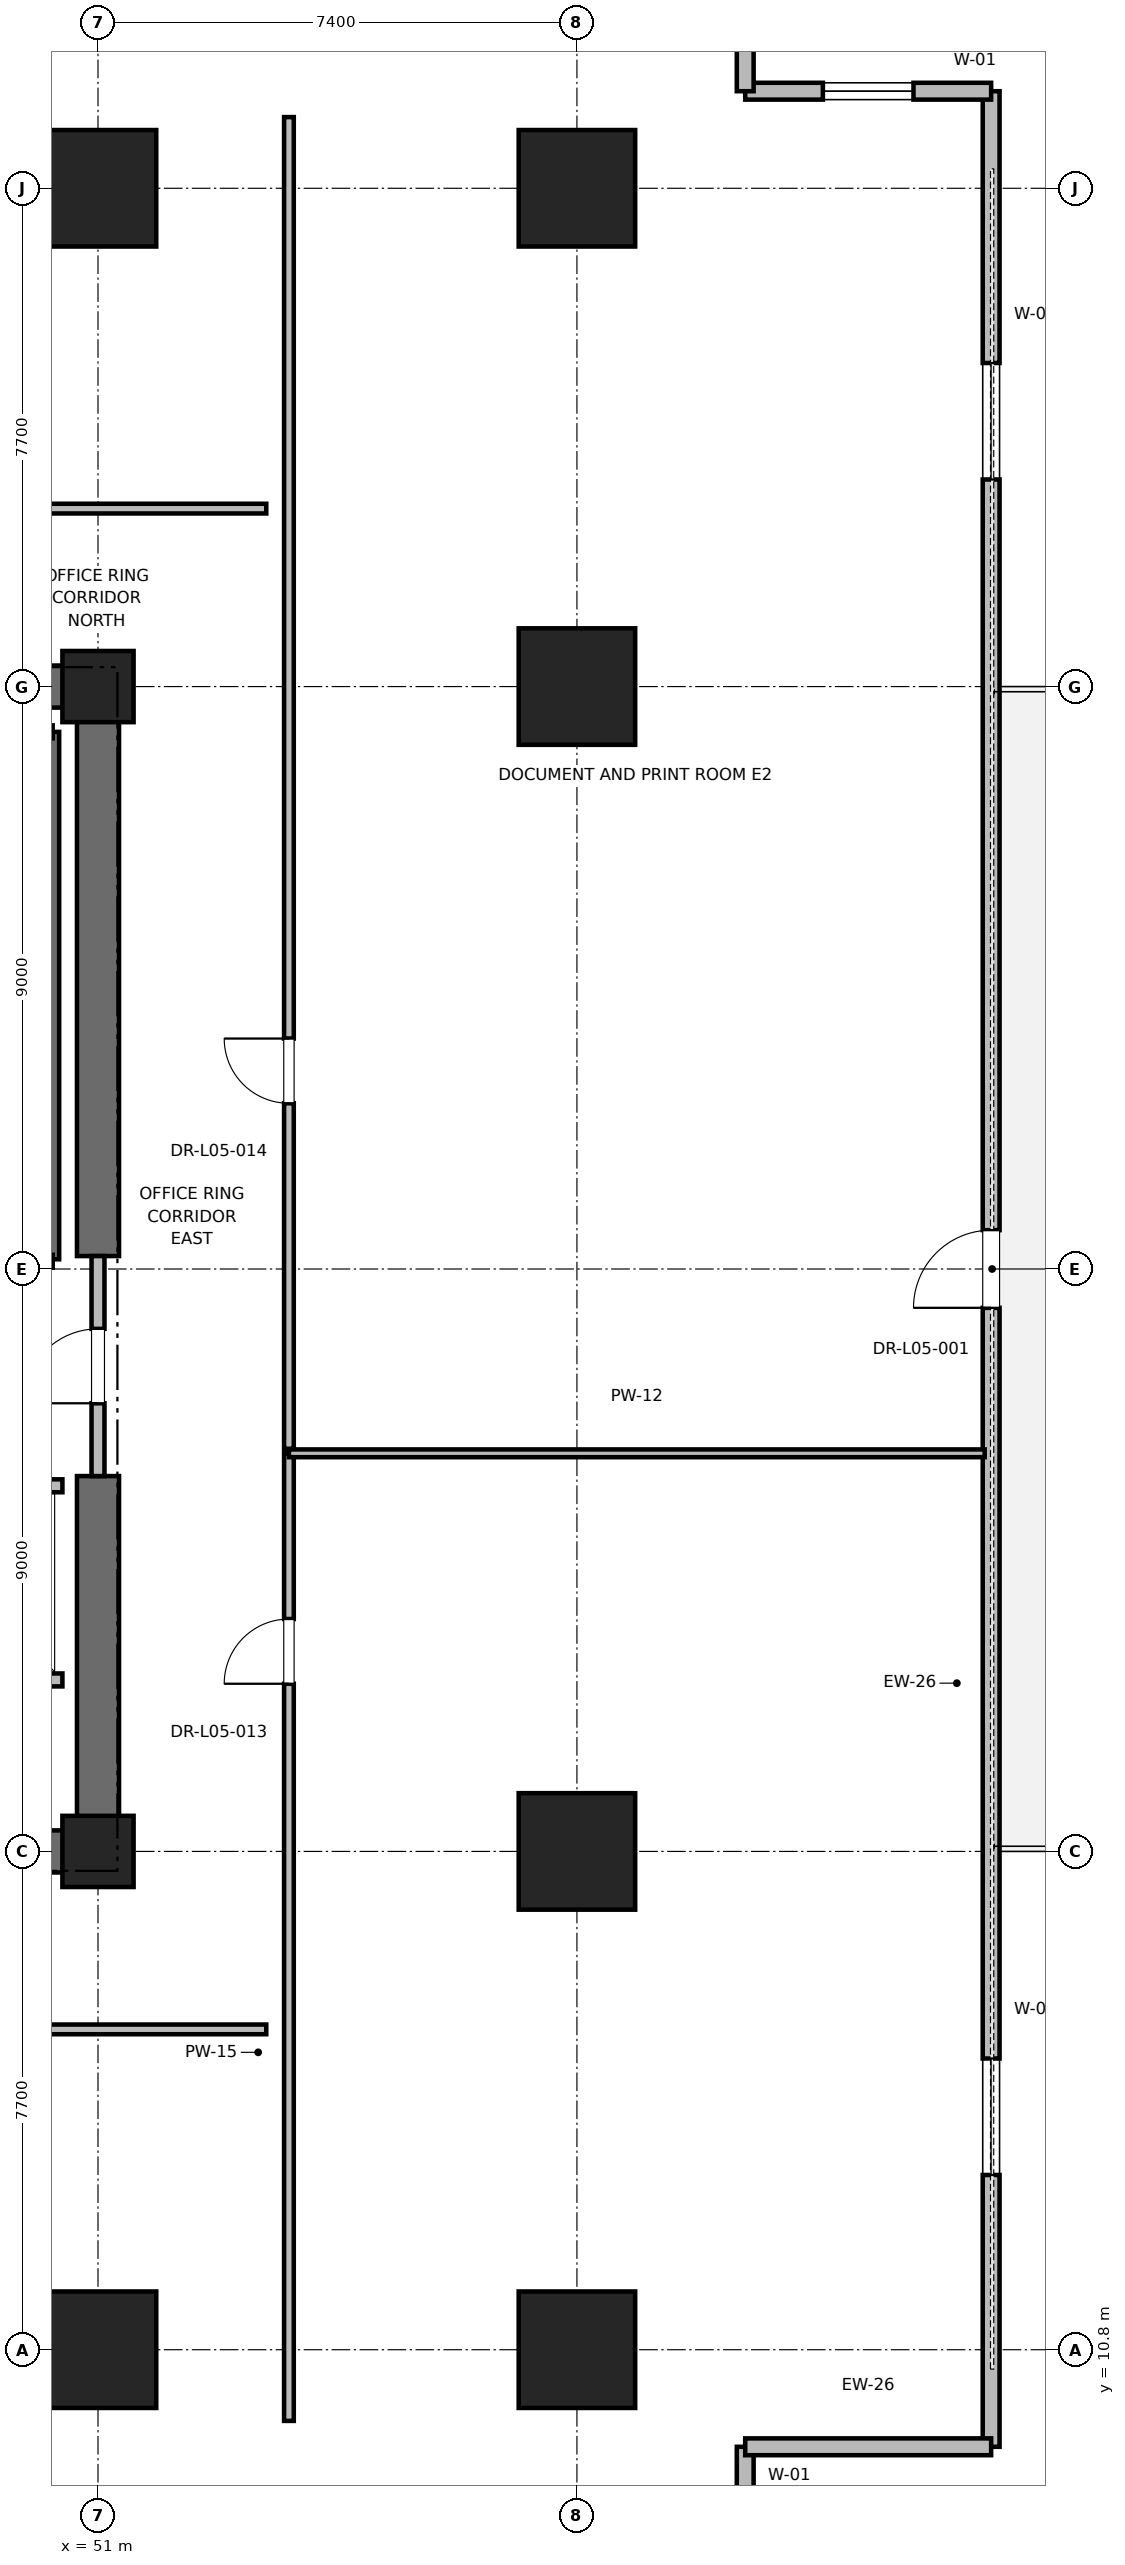
"""IFC4 building model, lengths in metres.
Left out: names, types, materials, properties, quantities, classifications, styles, units other than length and angle.
Written with IfcOpenShell. Run it as: python <this file> out.ifc"""

import sys

from ifc_helpers import new_model, si_unit, direction, frame, frame_2d, origin, origin_2d, place, context, subcontext, project, spatial, rectangle, extrude, element, fill, save


model = new_model("IFC4")
c1 = context("Model", 3, precision=1e-05, world=origin(), true_north=direction((0.0, 1.0)))
c2 = subcontext(c1, "Body", "Model", "MODEL_VIEW")
j1 = project(units=[si_unit("LENGTHUNIT", "METRE"), si_unit("PLANEANGLEUNIT", "RADIAN")], contexts=[c1])
p1 = place(None, origin())
s1 = spatial("IfcSite", under=j1, at=p1, CompositionType="ELEMENT")
p2 = place(p1, origin())
s2 = spatial("IfcBuilding", under=s1, at=p2, CompositionType="ELEMENT")
p3 = place(p2, frame((0.0, 0.0, 27.6)))
s3 = spatial("IfcBuildingStorey", under=s2, at=p3, CompositionType="ELEMENT", Elevation=27.6)
for number, where, z_axis, x_axis in (
    (1, (51.0, 10.8, 0.0), (0.0, 0.0, 1.0), (1.0, 0.0, 0.0)),
    (2, (51.0, 44.2, 0.0), (0.0, 0.0, 1.0), (1.0, 0.0, 0.0)),
    (3, (58.4, 18.5, 0.0), (0.0, 0.0, 1.0), (1.0, 0.0, 0.0)),
    (4, (58.4, 36.5, 0.0), (0.0, 0.0, 1.0), (1.0, 0.0, 0.0)),
    (5, (58.4, 10.8, 0.0), (0.0, 0.0, 1.0), (1.0, 0.0, 0.0)),
    (6, (58.4, 44.2, 0.0), (0.0, 0.0, 1.0), (1.0, 0.0, 0.0)),
):
    element("IfcColumn", number, at=place(p3, frame(where, z_axis=z_axis, x_axis=x_axis)), inside=s3, PredefinedType="COLUMN", context=c2, shape_type="SweptSolid", body=[
        extrude(rectangle(XDim=1.8, YDim=1.8, at=origin_2d()), origin(), (0.0, 0.0, 1.0), 4.0),
    ])
for number, where, z_axis, x_axis in (
    (7, (51.0, 18.5, 0.0), (0.0, 0.0, 1.0), (1.0, 0.0, 0.0)),
    (8, (51.0, 36.5, 0.0), (0.0, 0.0, 1.0), (1.0, 0.0, 0.0)),
):
    element("IfcColumn", number, at=place(p3, frame(where, z_axis=z_axis, x_axis=x_axis)), inside=s3, PredefinedType="PILASTER", context=c2, shape_type="SweptSolid", body=[
        extrude(rectangle(XDim=1.1, YDim=1.1, at=origin_2d()), origin(), (0.0, 0.0, 1.0), 4.0),
    ])
p4 = place(p3, frame((41.8, 18.5, 0.0), z_axis=(0.0, 0.0, 1.0), x_axis=(1.0, 0.0, 0.0)))
e9 = element("IfcWall", 9, at=p4, inside=s3, PredefinedType="SHEAR", context=c2, shape_type="SweptSolid", body=[
    extrude(rectangle(XDim=9.2, YDim=0.65, at=frame_2d((4.6, 0.0))), origin(), (0.0, 0.0, 1.0), 3.76),
])
for number, where, z_axis, x_axis in (
    (10, (45.2, 36.5, 0.0), (0.0, 0.0, 1.0), (1.0, 0.0, 0.0)),
    (11, (51.0, 18.5, 0.0), (0.0, 0.0, 1.0), (0.0, 1.0, 0.0)),
):
    element("IfcWall", number, at=place(p3, frame(where, z_axis=z_axis, x_axis=x_axis)), inside=s3, PredefinedType="SHEAR", context=c2, shape_type="SweptSolid", body=[
        extrude(rectangle(XDim=5.8, YDim=0.65, at=frame_2d((2.9, 0.0))), origin(), (0.0, 0.0, 1.0), 3.76),
    ])
p5 = place(p3, frame((51.0, 27.7, 0.0), z_axis=(0.0, 0.0, 1.0), x_axis=(0.0, 1.0, 0.0)))
e12 = element("IfcWall", 12, at=p5, inside=s3, PredefinedType="SHEAR", context=c2, shape_type="SweptSolid", body=[
    extrude(rectangle(XDim=8.8, YDim=0.65, at=frame_2d((4.4, 0.0))), origin(), (0.0, 0.0, 1.0), 3.76),
])
p6 = place(p3, frame((64.8, 9.3, 0.0), z_axis=(0.0, 0.0, 1.0), x_axis=(0.0, 1.0, 0.0)))
e13 = element("IfcWall", 13, at=p6, inside=s3, PredefinedType="PARAPET", context=c2, shape_type="SweptSolid", body=[
    extrude(rectangle(XDim=36.4, YDim=0.26, at=frame_2d((18.2, 0.0))), origin(), (0.0, 0.0, 1.0), 2.889),
])
p7 = place(p6, frame((4.2, 0.0, 0.85)))
e14 = element("IfcOpeningElement", 14, at=p7, cuts=e13, PredefinedType="OPENING", context=c2, shape_type="SweptSolid", body=[
    extrude(rectangle(XDim=1.8, YDim=2.2, at=frame_2d((0.9, 1.1))), frame((0.0, 0.13, 0.0), z_axis=(0.0, -1.0, 0.0), x_axis=(1.0, 0.0, 0.0)), (0.0, 0.0, 1.0), 0.26),
])
p8 = place(p6, frame((17.6, 0.0, 0.0)))
e15 = element("IfcOpeningElement", 15, at=p8, cuts=e13, PredefinedType="OPENING", context=c2, shape_type="SweptSolid", body=[
    extrude(rectangle(XDim=1.2, YDim=2.2, at=frame_2d((0.6, 1.1))), frame((0.0, 0.13, 0.0), z_axis=(0.0, -1.0, 0.0), x_axis=(1.0, 0.0, 0.0)), (0.0, 0.0, 1.0), 0.26),
])
p9 = place(p6, frame((30.4, 0.0, 0.85)))
e16 = element("IfcOpeningElement", 16, at=p9, cuts=e13, PredefinedType="OPENING", context=c2, shape_type="SweptSolid", body=[
    extrude(rectangle(XDim=1.8, YDim=2.2, at=frame_2d((0.9, 1.1))), frame((0.0, 0.13, 0.0), z_axis=(0.0, -1.0, 0.0), x_axis=(1.0, 0.0, 0.0)), (0.0, 0.0, 1.0), 0.26),
])
p10 = place(p3, frame((61.0, 5.9, 0.0), z_axis=(0.0, 0.0, 1.0), x_axis=(0.0, 1.0, 0.0)))
e17 = element("IfcWall", 17, at=p10, inside=s3, PredefinedType="PARAPET", context=c2, shape_type="SweptSolid", body=[
    extrude(rectangle(XDim=3.4, YDim=0.26, at=frame_2d((1.7, 0.0))), origin(), (0.0, 0.0, 1.0), 3.76),
])
p11 = place(p10, frame((1.0, 0.0, 0.85)))
e18 = element("IfcOpeningElement", 18, at=p11, cuts=e17, PredefinedType="OPENING", context=c2, shape_type="SweptSolid", body=[
    extrude(rectangle(XDim=1.4, YDim=2.0, at=frame_2d((0.7, 1.0))), frame((0.0, 0.13, 0.0), z_axis=(0.0, -1.0, 0.0), x_axis=(1.0, 0.0, 0.0)), (0.0, 0.0, 1.0), 0.26),
])
p12 = place(p3, frame((61.0, 9.3, 0.0), z_axis=(0.0, 0.0, 1.0), x_axis=(1.0, 0.0, 0.0)))
e19 = element("IfcWall", 19, at=p12, inside=s3, PredefinedType="PARAPET", context=c2, shape_type="SweptSolid", body=[
    extrude(rectangle(XDim=3.8, YDim=0.26, at=frame_2d((1.9, 0.0))), origin(), (0.0, 0.0, 1.0), 3.76),
])
p13 = place(p3, frame((64.8, 45.7, 0.0), z_axis=(0.0, 0.0, 1.0), x_axis=(-1.0, 0.0, 0.0)))
e20 = element("IfcWall", 20, at=p13, inside=s3, PredefinedType="PARAPET", context=c2, shape_type="SweptSolid", body=[
    extrude(rectangle(XDim=3.8, YDim=0.26, at=frame_2d((1.9, 0.0))), origin(), (0.0, 0.0, 1.0), 3.76),
])
p14 = place(p13, frame((1.2, 0.0, 0.85)))
e21 = element("IfcOpeningElement", 21, at=p14, cuts=e20, PredefinedType="OPENING", context=c2, shape_type="SweptSolid", body=[
    extrude(rectangle(XDim=1.4, YDim=2.0, at=frame_2d((0.7, 1.0))), frame((0.0, 0.13, 0.0), z_axis=(0.0, -1.0, 0.0), x_axis=(1.0, 0.0, 0.0)), (0.0, 0.0, 1.0), 0.26),
])
p15 = place(p3, frame((61.0, 45.7, 0.0), z_axis=(0.0, 0.0, 1.0), x_axis=(0.0, 1.0, 0.0)))
e22 = element("IfcWall", 22, at=p15, inside=s3, PredefinedType="PARAPET", context=c2, shape_type="SweptSolid", body=[
    extrude(rectangle(XDim=3.4, YDim=0.26, at=frame_2d((1.7, 0.0))), origin(), (0.0, 0.0, 1.0), 3.76),
])
p16 = place(p3, frame((50.3, 27.65, 0.0), z_axis=(0.0, 0.0, 1.0), x_axis=(0.0, 1.0, 0.0)))
e23 = element("IfcWall", 23, at=p16, inside=s3, PredefinedType="SOLIDWALL", context=c2, shape_type="SweptSolid", body=[
    extrude(rectangle(XDim=8.15, YDim=0.2, at=frame_2d((4.075, 0.0))), origin(), (0.0, 0.0, 1.0), 3.76),
])
p17 = place(p3, frame((51.0, 24.3, 0.0), z_axis=(0.0, 0.0, 1.0), x_axis=(0.0, 1.0, 0.0)))
e24 = element("IfcWall", 24, at=p17, inside=s3, PredefinedType="PARTITIONING", context=c2, shape_type="SweptSolid", body=[
    extrude(rectangle(XDim=3.4, YDim=0.2, at=frame_2d((1.7, 0.0))), origin(), (0.0, 0.0, 1.0), 2.54),
])
p18 = place(p17, frame((1.125, 0.0, 0.0)))
e25 = element("IfcOpeningElement", 25, at=p18, cuts=e24, PredefinedType="OPENING", context=c2, shape_type="SweptSolid", body=[
    extrude(rectangle(XDim=1.15, YDim=2.2, at=frame_2d((0.575, 1.1))), frame((0.0, 0.1, 0.0), z_axis=(0.0, -1.0, 0.0), x_axis=(1.0, 0.0, 0.0)), (0.0, 0.0, 1.0), 0.2),
])
p19 = place(p3, frame((47.85, 21.15, 0.0), z_axis=(0.0, 0.0, 1.0), x_axis=(1.0, 0.0, 0.0)))
e26 = element("IfcWall", 26, at=p19, inside=s3, PredefinedType="SOLIDWALL", context=c2, shape_type="SweptSolid", body=[
    extrude(rectangle(XDim=2.6, YDim=0.2, at=frame_2d((1.3, 0.0))), origin(), (0.0, 0.0, 1.0), 3.76),
])
p20 = place(p3, frame((50.45, 24.15, 0.0), z_axis=(0.0, 0.0, 1.0), x_axis=(-1.0, 0.0, 0.0)))
e27 = element("IfcWall", 27, at=p20, inside=s3, PredefinedType="SOLIDWALL", context=c2, shape_type="SweptSolid", body=[
    extrude(rectangle(XDim=2.6, YDim=0.2, at=frame_2d((1.3, 0.0))), origin(), (0.0, 0.0, 1.0), 2.54),
])
p21 = place(p20, frame((0.75, 0.0, 0.0)))
e28 = element("IfcOpeningElement", 28, at=p21, cuts=e27, PredefinedType="OPENING", context=c2, shape_type="SweptSolid", body=[
    extrude(rectangle(XDim=1.1, YDim=2.2, at=frame_2d((0.55, 1.1))), frame((0.0, 0.1, 0.0), z_axis=(0.0, -1.0, 0.0), x_axis=(1.0, 0.0, 0.0)), (0.0, 0.0, 1.0), 0.2),
])
p22 = place(p3, frame((38.982, 39.25, 0.0), z_axis=(0.0, 0.0, 1.0), x_axis=(1.0, 0.0, 0.0)))
e29 = element("IfcWall", 29, at=p22, inside=s3, PredefinedType="PARTITIONING", context=c2, shape_type="SweptSolid", body=[
    extrude(rectangle(XDim=14.618, YDim=0.15, at=frame_2d((7.309, 0.0))), origin(), (0.0, 0.0, 1.0), 2.85),
])
p23 = place(p22, frame((6.734, 0.0, 0.0)))
e30 = element("IfcOpeningElement", 30, at=p23, cuts=e29, PredefinedType="OPENING", context=c2, shape_type="SweptSolid", body=[
    extrude(rectangle(XDim=1.05, YDim=2.2, at=frame_2d((0.525, 1.1))), frame((0.0, 0.075, 0.0), z_axis=(0.0, -1.0, 0.0), x_axis=(1.0, 0.0, 0.0)), (0.0, 0.0, 1.0), 0.15),
])
p24 = place(p3, frame((44.966, 15.75, 0.0), z_axis=(0.0, 0.0, 1.0), x_axis=(1.0, 0.0, 0.0)))
e31 = element("IfcWall", 31, at=p24, inside=s3, PredefinedType="PARTITIONING", context=c2, shape_type="SweptSolid", body=[
    extrude(rectangle(XDim=8.634, YDim=0.15, at=frame_2d((4.317, 0.0))), origin(), (0.0, 0.0, 1.0), 2.85),
])
p25 = place(p24, frame((3.767, 0.0, 0.0)))
e32 = element("IfcOpeningElement", 32, at=p25, cuts=e31, PredefinedType="OPENING", context=c2, shape_type="SweptSolid", body=[
    extrude(rectangle(XDim=1.0, YDim=2.15, at=frame_2d((0.5, 1.075))), frame((0.0, 0.075, 0.0), z_axis=(0.0, -1.0, 0.0), x_axis=(1.0, 0.0, 0.0)), (0.0, 0.0, 1.0), 0.15),
])
p26 = place(p3, frame((53.95, 9.7, 0.0), z_axis=(0.0, 0.0, 1.0), x_axis=(0.0, 1.0, 0.0)))
e33 = element("IfcWall", 33, at=p26, inside=s3, PredefinedType="PARTITIONING", context=c2, shape_type="SweptSolid", body=[
    extrude(rectangle(XDim=14.952, YDim=0.15, at=frame_2d((7.476, 0.0))), origin(), (0.0, 0.0, 1.0), 2.85),
])
p27 = place(p26, frame((11.391, 0.0, 0.0)))
e34 = element("IfcOpeningElement", 34, at=p27, cuts=e33, PredefinedType="OPENING", context=c2, shape_type="SweptSolid", body=[
    extrude(rectangle(XDim=1.0, YDim=2.15, at=frame_2d((0.5, 1.075))), frame((0.0, 0.075, 0.0), z_axis=(0.0, -1.0, 0.0), x_axis=(1.0, 0.0, 0.0)), (0.0, 0.0, 1.0), 0.15),
])
p28 = place(p3, frame((53.95, 24.652, 0.0), z_axis=(0.0, 0.0, 1.0), x_axis=(1.0, 0.0, 0.0)))
e35 = element("IfcWall", 35, at=p28, inside=s3, PredefinedType="PARTITIONING", context=c2, shape_type="SweptSolid", body=[
    extrude(rectangle(XDim=10.75, YDim=0.12, at=frame_2d((5.375, 0.0))), origin(), (0.0, 0.0, 1.0), 2.85),
])
p29 = place(p3, frame((53.95, 24.722, 0.0), z_axis=(0.0, 0.0, 1.0), x_axis=(0.0, 1.0, 0.0)))
e36 = element("IfcWall", 36, at=p29, inside=s3, PredefinedType="PARTITIONING", context=c2, shape_type="SweptSolid", body=[
    extrude(rectangle(XDim=20.578, YDim=0.15, at=frame_2d((10.289, 0.0))), origin(), (0.0, 0.0, 1.0), 2.85),
])
p30 = place(p29, frame((5.339, 0.0, 0.0)))
e37 = element("IfcOpeningElement", 37, at=p30, cuts=e36, PredefinedType="OPENING", context=c2, shape_type="SweptSolid", body=[
    extrude(rectangle(XDim=1.0, YDim=2.15, at=frame_2d((0.5, 1.075))), frame((0.0, 0.075, 0.0), z_axis=(0.0, -1.0, 0.0), x_axis=(1.0, 0.0, 0.0)), (0.0, 0.0, 1.0), 0.15),
])
p31 = place(p7, origin())
e38 = element("IfcWindow", 38, at=p31, inside=s3, PartitioningType="SINGLE_PANEL", PredefinedType="WINDOW", context=c2, shape_type="SweptSolid", body=[
    extrude(rectangle(XDim=1.8, YDim=2.2, at=frame_2d((0.9, 1.1))), frame((0.0, 0.03, 0.0), z_axis=(0.0, -1.0, 0.0), x_axis=(1.0, 0.0, 0.0)), (0.0, 0.0, 1.0), 0.06),
])
fill(e14, e38)
p32 = place(p8, origin())
e39 = element("IfcDoor", 39, at=p32, inside=s3, OperationType="SINGLE_SWING_LEFT", PredefinedType="DOOR", context=c2, shape_type="SweptSolid", body=[
    extrude(rectangle(XDim=1.2, YDim=2.2, at=frame_2d((0.6, 1.1))), frame((0.0, 0.025, 0.0), z_axis=(0.0, -1.0, 0.0), x_axis=(1.0, 0.0, 0.0)), (0.0, 0.0, 1.0), 0.05),
])
fill(e15, e39)
p33 = place(p9, origin())
e40 = element("IfcWindow", 40, at=p33, inside=s3, PartitioningType="SINGLE_PANEL", PredefinedType="WINDOW", context=c2, shape_type="SweptSolid", body=[
    extrude(rectangle(XDim=1.8, YDim=2.2, at=frame_2d((0.9, 1.1))), frame((0.0, 0.03, 0.0), z_axis=(0.0, -1.0, 0.0), x_axis=(1.0, 0.0, 0.0)), (0.0, 0.0, 1.0), 0.06),
])
fill(e16, e40)
p34 = place(p14, origin())
e41 = element("IfcWindow", 41, at=p34, inside=s3, PartitioningType="SINGLE_PANEL", PredefinedType="WINDOW", context=c2, shape_type="SweptSolid", body=[
    extrude(rectangle(XDim=1.4, YDim=2.0, at=frame_2d((0.7, 1.0))), frame((0.0, 0.03, 0.0), z_axis=(0.0, -1.0, 0.0), x_axis=(1.0, 0.0, 0.0)), (0.0, 0.0, 1.0), 0.06),
])
fill(e21, e41)
p35 = place(p18, origin())
e42 = element("IfcDoor", 42, at=p35, inside=s3, OperationType="SINGLE_SWING_LEFT", PredefinedType="DOOR", context=c2, shape_type="SweptSolid", body=[
    extrude(rectangle(XDim=1.15, YDim=2.2, at=frame_2d((0.575, 1.1))), frame((0.0, 0.025, 0.0), z_axis=(0.0, -1.0, 0.0), x_axis=(1.0, 0.0, 0.0)), (0.0, 0.0, 1.0), 0.05),
])
fill(e25, e42)
p36 = place(p27, origin())
e43 = element("IfcDoor", 43, at=p36, inside=s3, OperationType="SINGLE_SWING_LEFT", PredefinedType="DOOR", context=c2, shape_type="SweptSolid", body=[
    extrude(rectangle(XDim=1.0, YDim=2.15, at=frame_2d((0.5, 1.075))), frame((0.0, 0.025, 0.0), z_axis=(0.0, -1.0, 0.0), x_axis=(1.0, 0.0, 0.0)), (0.0, 0.0, 1.0), 0.05),
])
fill(e34, e43)
p37 = place(p30, origin())
e44 = element("IfcDoor", 44, at=p37, inside=s3, OperationType="SINGLE_SWING_RIGHT", PredefinedType="DOOR", context=c2, shape_type="SweptSolid", body=[
    extrude(rectangle(XDim=1.0, YDim=2.15, at=frame_2d((0.5, 1.075))), frame((0.0, 0.025, 0.0), z_axis=(0.0, -1.0, 0.0), x_axis=(1.0, 0.0, 0.0)), (0.0, 0.0, 1.0), 0.05),
])
fill(e37, e44)
save(model, sys.argv[1])
